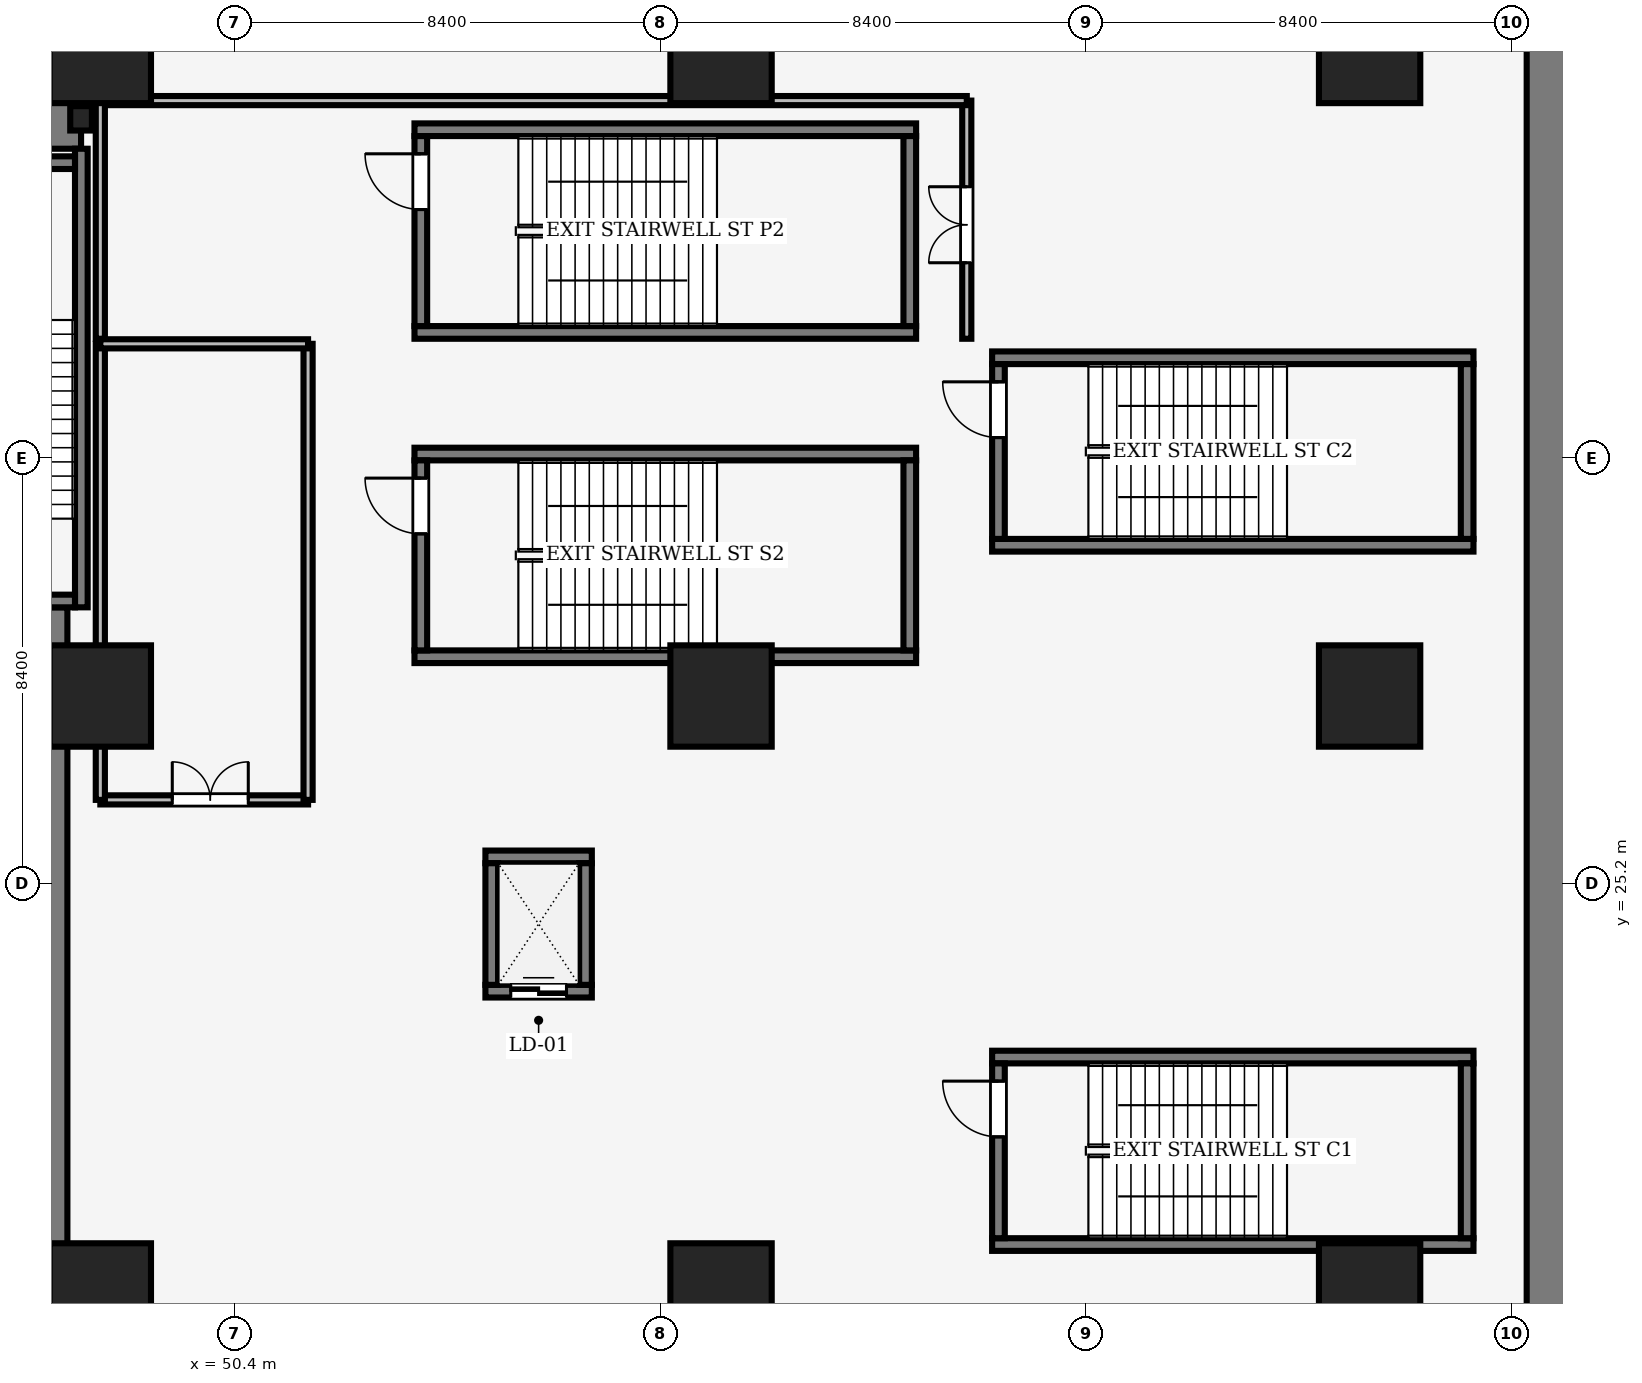
"""IFC4 building model, lengths in metres.
Left out: names, types, materials, properties, quantities, classifications, styles, units other than length and angle.
Written with IfcOpenShell. Run it as: python <this file> out.ifc"""

import sys

from ifc_helpers import new_model, si_unit, direction, frame, frame_2d, origin, origin_2d, place, context, subcontext, project, spatial, rectangle, i_section, extrude, source, transform, mapped, element, fill, save


model = new_model("IFC4")
c1 = context("Model", 3, precision=1e-05, world=origin(), true_north=direction((0.0, 1.0)))
c2 = subcontext(c1, "Body", "Model", "MODEL_VIEW")
j1 = project(units=[si_unit("LENGTHUNIT", "METRE"), si_unit("PLANEANGLEUNIT", "RADIAN")], contexts=[c1])
p1 = place(None, origin())
s1 = spatial("IfcSite", under=j1, at=p1, CompositionType="ELEMENT")
p2 = place(p1, origin())
s2 = spatial("IfcBuilding", under=s1, at=p2, CompositionType="ELEMENT")
p3 = place(p2, frame((0.0, 0.0, -11.4)))
s3 = spatial("IfcBuildingStorey", under=s2, at=p3, CompositionType="ELEMENT", Elevation=-11.4)
m1 = source(origin(), c2, "Body", "SweptSolid", [
    extrude(rectangle(XDim=17.52, YDim=1.2, at=frame_2d((8.76, 0.0))), origin(), (0.0, 0.0, 1.0), 5.04),
])
p4 = place(p3, frame((29.85, 40.3, 0.0), z_axis=(0.0, 0.0, 1.0), x_axis=(1.0, 0.0, 0.0)))
e1 = element("IfcWall", 1, at=p4, inside=s3, PredefinedType="SHEAR", context=c2, shape_type="MappedRepresentation", body=[
    mapped(m1, transform((0.0, 0.0, 0.0), scale=1.0)),
])
m2 = source(origin(), c2, "Body", "SweptSolid", [
    extrude(rectangle(XDim=13.15, YDim=1.2, at=frame_2d((6.575, 0.0))), origin(), (0.0, 0.0, 1.0), 5.04),
])
p5 = place(p3, frame((46.5, 17.5, 0.0), z_axis=(0.0, 0.0, 1.0), x_axis=(0.0, 1.0, 0.0)))
e2 = element("IfcWall", 2, at=p5, inside=s3, PredefinedType="SHEAR", context=c2, shape_type="MappedRepresentation", body=[
    mapped(m2, transform((0.0, 0.0, 0.0), scale=1.0)),
])
m3 = source(origin(), c2, "Body", "SweptSolid", [
    extrude(rectangle(XDim=48.6, YDim=0.9, at=frame_2d((24.3, 0.0))), origin(), (0.0, 0.0, 1.0), 5.04),
])
p6 = place(p3, frame((76.35, 0.9, 0.0), z_axis=(0.0, 0.0, 1.0), x_axis=(0.0, 1.0, 0.0)))
e3 = element("IfcWall", 3, at=p6, inside=s3, PredefinedType="SOLIDWALL", context=c2, shape_type="MappedRepresentation", body=[
    mapped(m3, transform((0.0, 0.0, 0.0), scale=1.0)),
])
m4 = source(origin(), c2, "Body", "SweptSolid", [
    extrude(i_section(OverallWidth=0.428, OverallDepth=0.481, WebThickness=0.04, FlangeThickness=0.063, FilletRadius=0.015, at=origin_2d()), origin(), (0.0, 0.0, 1.0), 5.04),
])
p7 = place(p3, frame((47.37, 40.3, 0.0), z_axis=(0.0, 0.0, 1.0), x_axis=(1.0, 0.0, 0.0)))
e4 = element("IfcColumn", 4, at=p7, inside=s3, PredefinedType="COLUMN", context=c2, shape_type="MappedRepresentation", body=[
    mapped(m4, transform((0.0, 0.0, 0.0), scale=1.0)),
])
m5 = source(origin(), c2, "Body", "SweptSolid", [
    extrude(rectangle(XDim=2.0, YDim=2.0, at=origin_2d()), origin(), (0.0, 0.0, 1.0), 5.04),
])
for number, where, z_axis, x_axis in (
    (5, (47.75, 17.1, 0.0), (0.0, 0.0, 1.0), (1.0, 0.0, 0.0)),
    (6, (60.0, 17.1, 0.0), (0.0, 0.0, 1.0), (1.0, 0.0, 0.0)),
    (7, (72.8, 17.1, 0.0), (0.0, 0.0, 1.0), (1.0, 0.0, 0.0)),
    (8, (47.75, 28.9, 0.0), (0.0, 0.0, 1.0), (1.0, 0.0, 0.0)),
    (9, (60.0, 28.9, 0.0), (0.0, 0.0, 1.0), (1.0, 0.0, 0.0)),
    (10, (72.8, 28.9, 0.0), (0.0, 0.0, 1.0), (1.0, 0.0, 0.0)),
    (11, (47.75, 41.6, 0.0), (0.0, 0.0, 1.0), (1.0, 0.0, 0.0)),
    (12, (60.0, 41.6, 0.0), (0.0, 0.0, 1.0), (1.0, 0.0, 0.0)),
    (13, (72.8, 41.6, 0.0), (0.0, 0.0, 1.0), (1.0, 0.0, 0.0)),
):
    element("IfcColumn", number, at=place(p3, frame(where, z_axis=z_axis, x_axis=x_axis)), inside=s3, PredefinedType="COLUMN", context=c2, shape_type="MappedRepresentation", body=[
        mapped(m5, transform((0.0, 0.0, 0.0), scale=1.0)),
    ])
m6 = source(origin(), c2, "Body", "SweptSolid", [
    extrude(rectangle(XDim=9.05, YDim=0.25, at=frame_2d((4.525, 0.0))), origin(), (0.0, 0.0, 1.0), 5.2),
])
p8 = place(p3, frame((47.375, 30.65, 0.0), z_axis=(0.0, 0.0, 1.0), x_axis=(0.0, 1.0, 0.0)))
e14 = element("IfcWall", 14, at=p8, inside=s3, PredefinedType="SOLIDWALL", context=c2, shape_type="MappedRepresentation", body=[
    mapped(m6, transform((0.0, 0.0, 0.0), scale=1.0)),
])
m7 = source(origin(), c2, "Body", "SweptSolid", [
    extrude(rectangle(XDim=3.15, YDim=0.25, at=frame_2d((1.575, 0.0))), origin(), (0.0, 0.0, 1.0), 5.2),
])
p9 = place(p3, frame((44.1, 39.425, 0.0), z_axis=(0.0, 0.0, 1.0), x_axis=(1.0, 0.0, 0.0)))
e15 = element("IfcWall", 15, at=p9, inside=s3, PredefinedType="SOLIDWALL", context=c2, shape_type="MappedRepresentation", body=[
    mapped(m7, transform((0.0, 0.0, 0.0), scale=1.0)),
])
p10 = place(p3, frame((44.1, 30.775, 0.0), z_axis=(0.0, 0.0, 1.0), x_axis=(1.0, 0.0, 0.0)))
e16 = element("IfcWall", 16, at=p10, inside=s3, PredefinedType="SOLIDWALL", context=c2, shape_type="MappedRepresentation", body=[
    mapped(m7, transform((0.0, 0.0, 0.0), scale=1.0)),
])
m8 = source(origin(), c2, "Body", "SweptSolid", [
    extrude(rectangle(XDim=1.1, YDim=2.2, at=frame_2d((0.55, 1.1))), frame((0.0, 0.135, 0.0), z_axis=(0.0, -1.0, 0.0), x_axis=(1.0, 0.0, 0.0)), (0.0, 0.0, 1.0), 0.27),
])
p11 = place(p10, frame((0.35, 0.0, 0.0)))
e17 = element("IfcOpeningElement", 17, at=p11, cuts=e16, PredefinedType="OPENING", context=c2, shape_type="MappedRepresentation", body=[
    mapped(m8, transform((0.0, 0.0, 0.0), scale=1.0)),
])
m9 = source(origin(), c2, "Body", "SweptSolid", [
    extrude(rectangle(XDim=9.9, YDim=0.25, at=frame_2d((4.95, 0.0))), origin(), (0.0, 0.0, 1.0), 5.2),
])
for number, where, z_axis, x_axis in (
    (18, (53.95, 29.675, 0.0), (0.0, 0.0, 1.0), (1.0, 0.0, 0.0)),
    (19, (53.95, 33.675, 0.0), (0.0, 0.0, 1.0), (1.0, 0.0, 0.0)),
):
    element("IfcWall", number, at=place(p3, frame(where, z_axis=z_axis, x_axis=x_axis)), inside=s3, PredefinedType="SOLIDWALL", context=c2, shape_type="MappedRepresentation", body=[
        mapped(m9, transform((0.0, 0.0, 0.0), scale=1.0)),
    ])
m10 = source(origin(), c2, "Body", "SweptSolid", [
    extrude(rectangle(XDim=3.75, YDim=0.25, at=frame_2d((1.875, 0.0))), origin(), (0.0, 0.0, 1.0), 5.2),
])
p12 = place(p3, frame((63.725, 29.8, 0.0), z_axis=(0.0, 0.0, 1.0), x_axis=(0.0, 1.0, 0.0)))
e20 = element("IfcWall", 20, at=p12, inside=s3, PredefinedType="SOLIDWALL", context=c2, shape_type="MappedRepresentation", body=[
    mapped(m10, transform((0.0, 0.0, 0.0), scale=1.0)),
])
p13 = place(p3, frame((54.075, 29.8, 0.0), z_axis=(0.0, 0.0, 1.0), x_axis=(0.0, 1.0, 0.0)))
e21 = element("IfcWall", 21, at=p13, inside=s3, PredefinedType="SOLIDWALL", context=c2, shape_type="MappedRepresentation", body=[
    mapped(m10, transform((0.0, 0.0, 0.0), scale=1.0)),
])
p14 = place(p13, frame((2.3, 0.0, 0.0)))
e22 = element("IfcOpeningElement", 22, at=p14, cuts=e21, PredefinedType="OPENING", context=c2, shape_type="MappedRepresentation", body=[
    mapped(m8, transform((0.0, 0.0, 0.0), scale=1.0)),
])
for number, where, z_axis, x_axis in (
    (23, (53.95, 36.075, 0.0), (0.0, 0.0, 1.0), (1.0, 0.0, 0.0)),
    (24, (53.95, 40.075, 0.0), (0.0, 0.0, 1.0), (1.0, 0.0, 0.0)),
):
    element("IfcWall", number, at=place(p3, frame(where, z_axis=z_axis, x_axis=x_axis)), inside=s3, PredefinedType="SOLIDWALL", context=c2, shape_type="MappedRepresentation", body=[
        mapped(m9, transform((0.0, 0.0, 0.0), scale=1.0)),
    ])
p15 = place(p3, frame((63.725, 36.2, 0.0), z_axis=(0.0, 0.0, 1.0), x_axis=(0.0, 1.0, 0.0)))
e25 = element("IfcWall", 25, at=p15, inside=s3, PredefinedType="SOLIDWALL", context=c2, shape_type="MappedRepresentation", body=[
    mapped(m10, transform((0.0, 0.0, 0.0), scale=1.0)),
])
p16 = place(p3, frame((54.075, 36.2, 0.0), z_axis=(0.0, 0.0, 1.0), x_axis=(0.0, 1.0, 0.0)))
e26 = element("IfcWall", 26, at=p16, inside=s3, PredefinedType="SOLIDWALL", context=c2, shape_type="MappedRepresentation", body=[
    mapped(m10, transform((0.0, 0.0, 0.0), scale=1.0)),
])
p17 = place(p16, frame((2.3, 0.0, 0.0)))
e27 = element("IfcOpeningElement", 27, at=p17, cuts=e26, PredefinedType="OPENING", context=c2, shape_type="MappedRepresentation", body=[
    mapped(m8, transform((0.0, 0.0, 0.0), scale=1.0)),
])
m11 = source(origin(), c2, "Body", "SweptSolid", [
    extrude(rectangle(XDim=9.5, YDim=0.25, at=frame_2d((4.75, 0.0))), origin(), (0.0, 0.0, 1.0), 5.2),
])
for number, where, z_axis, x_axis in (
    (28, (65.35, 18.075, 0.0), (0.0, 0.0, 1.0), (1.0, 0.0, 0.0)),
    (29, (65.35, 21.775, 0.0), (0.0, 0.0, 1.0), (1.0, 0.0, 0.0)),
):
    element("IfcWall", number, at=place(p3, frame(where, z_axis=z_axis, x_axis=x_axis)), inside=s3, PredefinedType="SOLIDWALL", context=c2, shape_type="MappedRepresentation", body=[
        mapped(m11, transform((0.0, 0.0, 0.0), scale=1.0)),
    ])
m12 = source(origin(), c2, "Body", "SweptSolid", [
    extrude(rectangle(XDim=3.45, YDim=0.25, at=frame_2d((1.725, 0.0))), origin(), (0.0, 0.0, 1.0), 5.2),
])
p18 = place(p3, frame((74.725, 18.2, 0.0), z_axis=(0.0, 0.0, 1.0), x_axis=(0.0, 1.0, 0.0)))
e30 = element("IfcWall", 30, at=p18, inside=s3, PredefinedType="SOLIDWALL", context=c2, shape_type="MappedRepresentation", body=[
    mapped(m12, transform((0.0, 0.0, 0.0), scale=1.0)),
])
p19 = place(p3, frame((65.475, 18.2, 0.0), z_axis=(0.0, 0.0, 1.0), x_axis=(0.0, 1.0, 0.0)))
e31 = element("IfcWall", 31, at=p19, inside=s3, PredefinedType="SOLIDWALL", context=c2, shape_type="MappedRepresentation", body=[
    mapped(m12, transform((0.0, 0.0, 0.0), scale=1.0)),
])
p20 = place(p19, frame((2.0, 0.0, 0.0)))
e32 = element("IfcOpeningElement", 32, at=p20, cuts=e31, PredefinedType="OPENING", context=c2, shape_type="MappedRepresentation", body=[
    mapped(m8, transform((0.0, 0.0, 0.0), scale=1.0)),
])
for number, where, z_axis, x_axis in (
    (33, (65.35, 31.875, 0.0), (0.0, 0.0, 1.0), (1.0, 0.0, 0.0)),
    (34, (65.35, 35.575, 0.0), (0.0, 0.0, 1.0), (1.0, 0.0, 0.0)),
):
    element("IfcWall", number, at=place(p3, frame(where, z_axis=z_axis, x_axis=x_axis)), inside=s3, PredefinedType="SOLIDWALL", context=c2, shape_type="MappedRepresentation", body=[
        mapped(m11, transform((0.0, 0.0, 0.0), scale=1.0)),
    ])
p21 = place(p3, frame((74.725, 32.0, 0.0), z_axis=(0.0, 0.0, 1.0), x_axis=(0.0, 1.0, 0.0)))
e35 = element("IfcWall", 35, at=p21, inside=s3, PredefinedType="SOLIDWALL", context=c2, shape_type="MappedRepresentation", body=[
    mapped(m12, transform((0.0, 0.0, 0.0), scale=1.0)),
])
p22 = place(p3, frame((65.475, 32.0, 0.0), z_axis=(0.0, 0.0, 1.0), x_axis=(0.0, 1.0, 0.0)))
e36 = element("IfcWall", 36, at=p22, inside=s3, PredefinedType="SOLIDWALL", context=c2, shape_type="MappedRepresentation", body=[
    mapped(m12, transform((0.0, 0.0, 0.0), scale=1.0)),
])
p23 = place(p22, frame((2.0, 0.0, 0.0)))
e37 = element("IfcOpeningElement", 37, at=p23, cuts=e36, PredefinedType="OPENING", context=c2, shape_type="MappedRepresentation", body=[
    mapped(m8, transform((0.0, 0.0, 0.0), scale=1.0)),
])
m13 = source(origin(), c2, "Body", "SweptSolid", [
    extrude(rectangle(XDim=2.1, YDim=0.25, at=frame_2d((1.05, 0.0))), origin(), (0.0, 0.0, 1.0), 5.04),
])
p24 = place(p3, frame((55.35, 23.075, 0.0), z_axis=(0.0, 0.0, 1.0), x_axis=(1.0, 0.0, 0.0)))
e38 = element("IfcWall", 38, at=p24, inside=s3, PredefinedType="SOLIDWALL", context=c2, shape_type="MappedRepresentation", body=[
    mapped(m13, transform((0.0, 0.0, 0.0), scale=1.0)),
])
p25 = place(p24, frame((0.5, 0.0, 0.0)))
e39 = element("IfcOpeningElement", 39, at=p25, cuts=e38, PredefinedType="OPENING", context=c2, shape_type="MappedRepresentation", body=[
    mapped(m8, transform((0.0, 0.0, 0.0), scale=1.0)),
])
p26 = place(p3, frame((55.35, 25.725, 0.0), z_axis=(0.0, 0.0, 1.0), x_axis=(1.0, 0.0, 0.0)))
e40 = element("IfcWall", 40, at=p26, inside=s3, PredefinedType="SOLIDWALL", context=c2, shape_type="MappedRepresentation", body=[
    mapped(m13, transform((0.0, 0.0, 0.0), scale=1.0)),
])
m14 = source(origin(), c2, "Body", "SweptSolid", [
    extrude(rectangle(XDim=2.4, YDim=0.25, at=frame_2d((1.2, 0.0))), origin(), (0.0, 0.0, 1.0), 5.04),
])
for number, where, z_axis, x_axis in (
    (41, (55.475, 23.2, 0.0), (0.0, 0.0, 1.0), (0.0, 1.0, 0.0)),
    (42, (57.325, 23.2, 0.0), (0.0, 0.0, 1.0), (0.0, 1.0, 0.0)),
):
    element("IfcWall", number, at=place(p3, frame(where, z_axis=z_axis, x_axis=x_axis)), inside=s3, PredefinedType="SOLIDWALL", context=c2, shape_type="MappedRepresentation", body=[
        mapped(m14, transform((0.0, 0.0, 0.0), scale=1.0)),
    ])
m15 = source(origin(), c2, "Body", "SweptSolid", [
    extrude(rectangle(XDim=4.7, YDim=0.18, at=frame_2d((2.35, 0.0))), origin(), (0.0, 0.0, 1.0), 5.04),
])
p27 = place(p3, frame((64.85, 35.95, 0.0), z_axis=(0.0, 0.0, 1.0), x_axis=(0.0, 1.0, 0.0)))
e43 = element("IfcWall", 43, at=p27, inside=s3, PredefinedType="PARTITIONING", context=c2, shape_type="MappedRepresentation", body=[
    mapped(m15, transform((0.0, 0.0, 0.0), scale=1.0)),
])
m16 = source(origin(), c2, "Body", "SweptSolid", [
    extrude(rectangle(XDim=1.5, YDim=2.3, at=frame_2d((0.75, 1.15))), frame((0.0, 0.1, 0.0), z_axis=(0.0, -1.0, 0.0), x_axis=(1.0, 0.0, 0.0)), (0.0, 0.0, 1.0), 0.2),
])
p28 = place(p27, frame((1.5, 0.0, 0.0)))
e44 = element("IfcOpeningElement", 44, at=p28, cuts=e43, PredefinedType="OPENING", context=c2, shape_type="MappedRepresentation", body=[
    mapped(m16, transform((0.0, 0.0, 0.0), scale=1.0)),
])
m17 = source(origin(), c2, "Body", "SweptSolid", [
    extrude(rectangle(XDim=4.1, YDim=0.18, at=frame_2d((2.05, 0.0))), origin(), (0.0, 0.0, 1.0), 4.432),
])
p29 = place(p3, frame((47.75, 26.85, 0.0), z_axis=(0.0, 0.0, 1.0), x_axis=(1.0, 0.0, 0.0)))
e45 = element("IfcWall", 45, at=p29, inside=s3, PredefinedType="PARTITIONING", context=c2, shape_type="MappedRepresentation", body=[
    mapped(m17, transform((0.0, 0.0, 0.0), scale=1.0)),
])
p30 = place(p29, frame((1.42, 0.0, 0.0)))
e46 = element("IfcOpeningElement", 46, at=p30, cuts=e45, PredefinedType="OPENING", context=c2, shape_type="MappedRepresentation", body=[
    mapped(m16, transform((0.0, 0.0, 0.0), scale=1.0)),
])
m18 = source(origin(), c2, "Body", "SweptSolid", [
    extrude(rectangle(XDim=17.1, YDim=0.18, at=frame_2d((8.55, 0.0))), origin(), (0.0, 0.0, 1.0), 4.432),
])
p31 = place(p3, frame((47.75, 40.65, 0.0), z_axis=(0.0, 0.0, 1.0), x_axis=(1.0, 0.0, 0.0)))
e47 = element("IfcWall", 47, at=p31, inside=s3, PredefinedType="PARTITIONING", context=c2, shape_type="MappedRepresentation", body=[
    mapped(m18, transform((0.0, 0.0, 0.0), scale=1.0)),
])
m19 = source(origin(), c2, "Body", "SweptSolid", [
    extrude(rectangle(XDim=9.0, YDim=0.18, at=frame_2d((4.5, 0.0))), origin(), (0.0, 0.0, 1.0), 4.432),
])
p32 = place(p3, frame((47.75, 26.85, 0.0), z_axis=(0.0, 0.0, 1.0), x_axis=(0.0, 1.0, 0.0)))
e48 = element("IfcWall", 48, at=p32, inside=s3, PredefinedType="PARTITIONING", context=c2, shape_type="MappedRepresentation", body=[
    mapped(m19, transform((0.0, 0.0, 0.0), scale=1.0)),
])
m20 = source(origin(), c2, "Body", "SweptSolid", [
    extrude(rectangle(XDim=9.0, YDim=0.18, at=frame_2d((4.5, 0.0))), origin(), (0.0, 0.0, 1.0), 4.508),
])
p33 = place(p3, frame((51.85, 26.85, 0.0), z_axis=(0.0, 0.0, 1.0), x_axis=(0.0, 1.0, 0.0)))
e49 = element("IfcWall", 49, at=p33, inside=s3, PredefinedType="PARTITIONING", context=c2, shape_type="MappedRepresentation", body=[
    mapped(m20, transform((0.0, 0.0, 0.0), scale=1.0)),
])
m21 = source(origin(), c2, "Body", "SweptSolid", [
    extrude(rectangle(XDim=4.7, YDim=0.18, at=frame_2d((2.35, 0.0))), origin(), (0.0, 0.0, 1.0), 4.432),
])
p34 = place(p3, frame((47.75, 35.95, 0.0), z_axis=(0.0, 0.0, 1.0), x_axis=(0.0, 1.0, 0.0)))
e50 = element("IfcWall", 50, at=p34, inside=s3, PredefinedType="PARTITIONING", context=c2, shape_type="MappedRepresentation", body=[
    mapped(m21, transform((0.0, 0.0, 0.0), scale=1.0)),
])
p35 = place(p3, frame((47.75, 35.85, 0.0), z_axis=(0.0, 0.0, 1.0), x_axis=(1.0, 0.0, 0.0)))
e51 = element("IfcWall", 51, at=p35, inside=s3, PredefinedType="PARTITIONING", context=c2, shape_type="MappedRepresentation", body=[
    mapped(m17, transform((0.0, 0.0, 0.0), scale=1.0)),
])
m22 = source(origin(), c2, "Body", "SweptSolid", [
    extrude(rectangle(XDim=1.1, YDim=2.2, at=frame_2d((0.55, 1.1))), frame((0.0, 0.025, 0.0), z_axis=(0.0, -1.0, 0.0), x_axis=(1.0, 0.0, 0.0)), (0.0, 0.0, 1.0), 0.05),
])
p36 = place(p14, origin())
e52 = element("IfcDoor", 52, at=p36, inside=s3, OperationType="SINGLE_SWING_RIGHT", PredefinedType="DOOR", context=c2, shape_type="MappedRepresentation", body=[
    mapped(m22, transform((0.0, 0.0, 0.0), scale=1.0)),
])
fill(e22, e52)
p37 = place(p17, origin())
e53 = element("IfcDoor", 53, at=p37, inside=s3, OperationType="SINGLE_SWING_RIGHT", PredefinedType="DOOR", context=c2, shape_type="MappedRepresentation", body=[
    mapped(m22, transform((0.0, 0.0, 0.0), scale=1.0)),
])
fill(e27, e53)
p38 = place(p20, origin())
e54 = element("IfcDoor", 54, at=p38, inside=s3, OperationType="SINGLE_SWING_RIGHT", PredefinedType="DOOR", context=c2, shape_type="MappedRepresentation", body=[
    mapped(m22, transform((0.0, 0.0, 0.0), scale=1.0)),
])
fill(e32, e54)
p39 = place(p23, origin())
e55 = element("IfcDoor", 55, at=p39, inside=s3, OperationType="SINGLE_SWING_RIGHT", PredefinedType="DOOR", context=c2, shape_type="MappedRepresentation", body=[
    mapped(m22, transform((0.0, 0.0, 0.0), scale=1.0)),
])
fill(e37, e55)
p40 = place(p25, origin())
e56 = element("IfcDoor", 56, at=p40, inside=s3, OperationType="DOUBLE_DOOR_SLIDING", PredefinedType="DOOR", context=c2, shape_type="MappedRepresentation", body=[
    mapped(m22, transform((0.0, 0.0, 0.0), scale=1.0)),
])
fill(e39, e56)
m23 = source(origin(), c2, "Body", "SweptSolid", [
    extrude(rectangle(XDim=1.5, YDim=2.3, at=frame_2d((0.75, 1.15))), frame((0.0, 0.025, 0.0), z_axis=(0.0, -1.0, 0.0), x_axis=(1.0, 0.0, 0.0)), (0.0, 0.0, 1.0), 0.05),
])
p41 = place(p28, origin())
e57 = element("IfcDoor", 57, at=p41, inside=s3, OperationType="DOUBLE_DOOR_SINGLE_SWING", PredefinedType="DOOR", context=c2, shape_type="MappedRepresentation", body=[
    mapped(m23, transform((0.0, 0.0, 0.0), scale=1.0)),
])
fill(e44, e57)
p42 = place(p30, origin())
e58 = element("IfcDoor", 58, at=p42, inside=s3, OperationType="DOUBLE_DOOR_SINGLE_SWING", PredefinedType="DOOR", context=c2, shape_type="MappedRepresentation", body=[
    mapped(m23, transform((0.0, 0.0, 0.0), scale=1.0)),
])
fill(e46, e58)
save(model, sys.argv[1])
